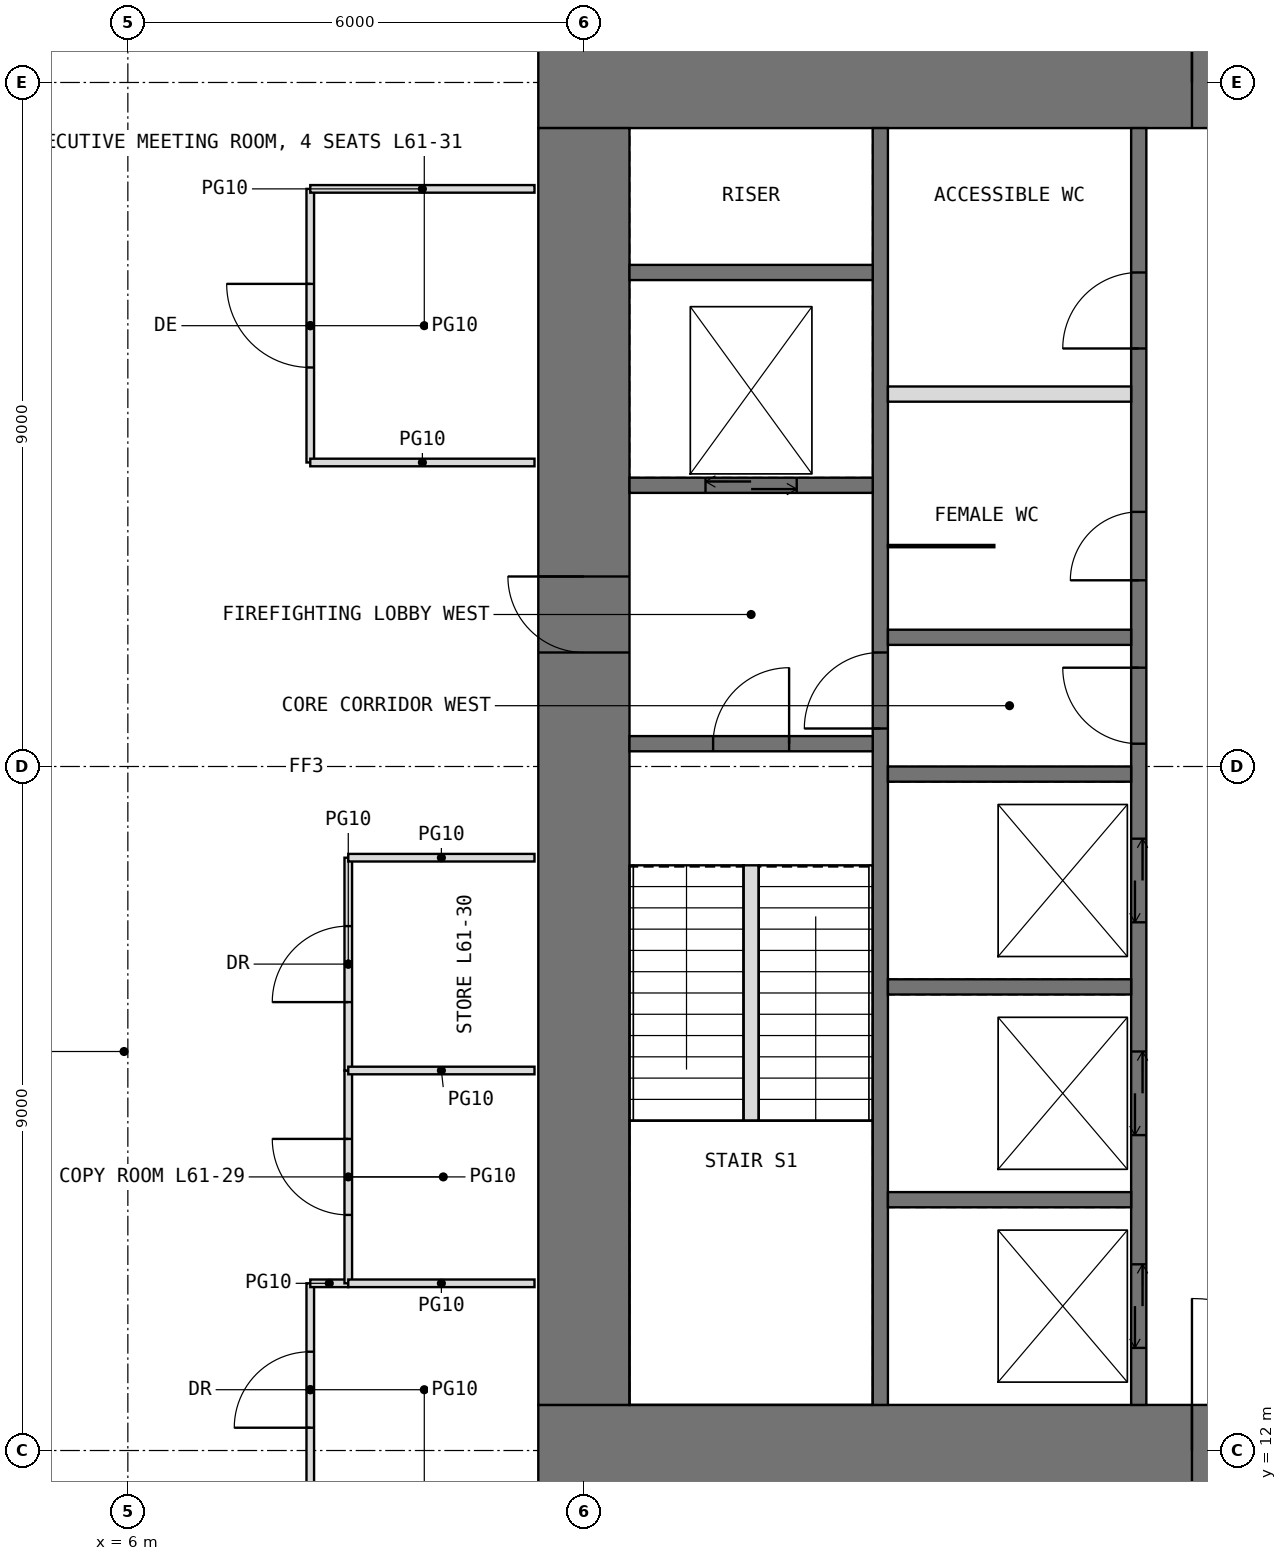
"""IFC4 building model, lengths in metres.
Left out: names, types, materials, properties, quantities, classifications, styles, units other than length and angle.
Written with IfcOpenShell. Run it as: python <this file> out.ifc"""

import sys

from ifc_helpers import new_model, si_unit, direction, frame, frame_2d, origin, place, context, subcontext, project, spatial, rectangle, extrude, element, fill, save


model = new_model("IFC4")
c1 = context("Model", 3, precision=1e-05, world=origin(), true_north=direction((0.0, 1.0)))
c2 = subcontext(c1, "Body", "Model", "MODEL_VIEW")
j1 = project(units=[si_unit("LENGTHUNIT", "METRE"), si_unit("PLANEANGLEUNIT", "RADIAN")], contexts=[c1])
p1 = place(None, origin())
s1 = spatial("IfcSite", under=j1, at=p1, CompositionType="ELEMENT")
p2 = place(p1, origin())
s2 = spatial("IfcBuilding", under=s1, at=p2, CompositionType="ELEMENT")
p3 = place(p2, frame((0.0, 0.0, 256.6)))
s3 = spatial("IfcBuildingStorey", under=s2, at=p3, CompositionType="ELEMENT", Elevation=256.6)
p4 = place(p3, frame((11.4, 12.0, -0.05), z_axis=(0.0, 0.0, 1.0), x_axis=(1.0, 0.0, 0.0)))
e1 = element("IfcWall", 1, at=p4, inside=s3, PredefinedType="SHEAR", context=c2, shape_type="SweptSolid", body=[
    extrude(rectangle(XDim=19.2, YDim=1.2, at=frame_2d((9.6, 0.0))), origin(), (0.0, 0.0, 1.0), 4.2),
])
p5 = place(p4, frame((8.6, 0.0, 0.05)))
e2 = element("IfcOpeningElement", 2, at=p5, cuts=e1, PredefinedType="OPENING", context=c2, shape_type="SweptSolid", body=[
    extrude(rectangle(XDim=2.0, YDim=2.2, at=frame_2d((1.0, 1.1))), frame((0.0, 0.61, 0.0), z_axis=(0.0, -1.0, 0.0), x_axis=(1.0, 0.0, 0.0)), (0.0, 0.0, 1.0), 1.22),
])
p6 = place(p3, frame((11.4, 30.0, -0.05), z_axis=(0.0, 0.0, 1.0), x_axis=(1.0, 0.0, 0.0)))
e3 = element("IfcWall", 3, at=p6, inside=s3, PredefinedType="SHEAR", context=c2, shape_type="SweptSolid", body=[
    extrude(rectangle(XDim=19.2, YDim=1.2, at=frame_2d((9.6, 0.0))), origin(), (0.0, 0.0, 1.0), 4.2),
])
p7 = place(p6, frame((8.6, 0.0, 0.05)))
e4 = element("IfcOpeningElement", 4, at=p7, cuts=e3, PredefinedType="OPENING", context=c2, shape_type="SweptSolid", body=[
    extrude(rectangle(XDim=2.0, YDim=2.2, at=frame_2d((1.0, 1.1))), frame((0.0, 0.61, 0.0), z_axis=(0.0, -1.0, 0.0), x_axis=(1.0, 0.0, 0.0)), (0.0, 0.0, 1.0), 1.22),
])
p8 = place(p3, frame((12.0, 12.6, -0.05), z_axis=(0.0, 0.0, 1.0), x_axis=(0.0, 1.0, 0.0)))
e5 = element("IfcWall", 5, at=p8, inside=s3, PredefinedType="SHEAR", context=c2, shape_type="SweptSolid", body=[
    extrude(rectangle(XDim=16.8, YDim=1.2, at=frame_2d((8.4, 0.0))), origin(), (0.0, 0.0, 1.0), 4.2),
])
p9 = place(p8, frame((9.9, 0.0, 0.05)))
e6 = element("IfcOpeningElement", 6, at=p9, cuts=e5, PredefinedType="OPENING", context=c2, shape_type="SweptSolid", body=[
    extrude(rectangle(XDim=1.0, YDim=2.2, at=frame_2d((0.5, 1.1))), frame((0.0, 0.61, 0.0), z_axis=(0.0, -1.0, 0.0), x_axis=(1.0, 0.0, 0.0)), (0.0, 0.0, 1.0), 1.22),
])
p10 = place(p3, frame((15.9, 12.6, -0.05), z_axis=(0.0, 0.0, 1.0), x_axis=(0.0, 1.0, 0.0)))
e7 = element("IfcWall", 7, at=p10, inside=s3, PredefinedType="SHEAR", context=c2, shape_type="SweptSolid", body=[
    extrude(rectangle(XDim=16.8, YDim=0.2, at=frame_2d((8.4, 0.0))), origin(), (0.0, 0.0, 1.0), 4.2),
])
p11 = place(p10, frame((8.9, 0.0, 0.05)))
e8 = element("IfcOpeningElement", 8, at=p11, cuts=e7, PredefinedType="OPENING", context=c2, shape_type="SweptSolid", body=[
    extrude(rectangle(XDim=1.0, YDim=2.2, at=frame_2d((0.5, 1.1))), frame((0.0, 0.11, 0.0), z_axis=(0.0, -1.0, 0.0), x_axis=(1.0, 0.0, 0.0)), (0.0, 0.0, 1.0), 0.22),
])
p12 = place(p3, frame((19.3, 12.6, -0.05), z_axis=(0.0, 0.0, 1.0), x_axis=(0.0, 1.0, 0.0)))
e9 = element("IfcWall", 9, at=p12, inside=s3, PredefinedType="SHEAR", context=c2, shape_type="SweptSolid", body=[
    extrude(rectangle(XDim=16.8, YDim=0.2, at=frame_2d((8.4, 0.0))), origin(), (0.0, 0.0, 1.0), 4.2),
])
p13 = place(p12, frame((8.7, 0.0, 0.05)))
e10 = element("IfcOpeningElement", 10, at=p13, cuts=e9, PredefinedType="OPENING", context=c2, shape_type="SweptSolid", body=[
    extrude(rectangle(XDim=1.0, YDim=2.2, at=frame_2d((0.5, 1.1))), frame((0.0, 0.11, 0.0), z_axis=(0.0, -1.0, 0.0), x_axis=(1.0, 0.0, 0.0)), (0.0, 0.0, 1.0), 0.22),
])
p14 = place(p12, frame((10.85, 0.0, 0.05)))
e11 = element("IfcOpeningElement", 11, at=p14, cuts=e9, PredefinedType="OPENING", context=c2, shape_type="SweptSolid", body=[
    extrude(rectangle(XDim=0.9, YDim=2.2, at=frame_2d((0.45, 1.1))), frame((0.0, 0.11, 0.0), z_axis=(0.0, -1.0, 0.0), x_axis=(1.0, 0.0, 0.0)), (0.0, 0.0, 1.0), 0.22),
])
p15 = place(p12, frame((13.9, 0.0, 0.05)))
e12 = element("IfcOpeningElement", 12, at=p15, cuts=e9, PredefinedType="OPENING", context=c2, shape_type="SweptSolid", body=[
    extrude(rectangle(XDim=1.0, YDim=2.2, at=frame_2d((0.5, 1.1))), frame((0.0, 0.11, 0.0), z_axis=(0.0, -1.0, 0.0), x_axis=(1.0, 0.0, 0.0)), (0.0, 0.0, 1.0), 0.22),
])
p16 = place(p12, frame((0.75, 0.0, 0.05)))
e13 = element("IfcOpeningElement", 13, at=p16, cuts=e9, PredefinedType="OPENING", context=c2, shape_type="SweptSolid", body=[
    extrude(rectangle(XDim=1.1, YDim=2.2, at=frame_2d((0.55, 1.1))), frame((0.0, 0.11, 0.0), z_axis=(0.0, -1.0, 0.0), x_axis=(1.0, 0.0, 0.0)), (0.0, 0.0, 1.0), 0.22),
])
p17 = place(p12, frame((3.55, 0.0, 0.05)))
e14 = element("IfcOpeningElement", 14, at=p17, cuts=e9, PredefinedType="OPENING", context=c2, shape_type="SweptSolid", body=[
    extrude(rectangle(XDim=1.1, YDim=2.2, at=frame_2d((0.55, 1.1))), frame((0.0, 0.11, 0.0), z_axis=(0.0, -1.0, 0.0), x_axis=(1.0, 0.0, 0.0)), (0.0, 0.0, 1.0), 0.22),
])
p18 = place(p12, frame((6.35, 0.0, 0.05)))
e15 = element("IfcOpeningElement", 15, at=p18, cuts=e9, PredefinedType="OPENING", context=c2, shape_type="SweptSolid", body=[
    extrude(rectangle(XDim=1.1, YDim=2.2, at=frame_2d((0.55, 1.1))), frame((0.0, 0.11, 0.0), z_axis=(0.0, -1.0, 0.0), x_axis=(1.0, 0.0, 0.0)), (0.0, 0.0, 1.0), 0.22),
])
p19 = place(p3, frame((12.6, 21.3, -0.05), z_axis=(0.0, 0.0, 1.0), x_axis=(1.0, 0.0, 0.0)))
e16 = element("IfcWall", 16, at=p19, inside=s3, PredefinedType="SHEAR", context=c2, shape_type="SweptSolid", body=[
    extrude(rectangle(XDim=3.2, YDim=0.2, at=frame_2d((1.6, 0.0))), origin(), (0.0, 0.0, 1.0), 4.2),
])
p20 = place(p19, frame((1.1, 0.0, 0.05)))
e17 = element("IfcOpeningElement", 17, at=p20, cuts=e16, PredefinedType="OPENING", context=c2, shape_type="SweptSolid", body=[
    extrude(rectangle(XDim=1.0, YDim=2.2, at=frame_2d((0.5, 1.1))), frame((0.0, 0.11, 0.0), z_axis=(0.0, -1.0, 0.0), x_axis=(1.0, 0.0, 0.0)), (0.0, 0.0, 1.0), 0.22),
])
p21 = place(p3, frame((12.6, 24.7, -0.05), z_axis=(0.0, 0.0, 1.0), x_axis=(1.0, 0.0, 0.0)))
e18 = element("IfcWall", 18, at=p21, inside=s3, PredefinedType="SHEAR", context=c2, shape_type="SweptSolid", body=[
    extrude(rectangle(XDim=3.2, YDim=0.2, at=frame_2d((1.6, 0.0))), origin(), (0.0, 0.0, 1.0), 4.2),
])
p22 = place(p21, frame((1.0, 0.0, 0.05)))
e19 = element("IfcOpeningElement", 19, at=p22, cuts=e18, PredefinedType="OPENING", context=c2, shape_type="SweptSolid", body=[
    extrude(rectangle(XDim=1.2, YDim=2.2, at=frame_2d((0.6, 1.1))), frame((0.0, 0.11, 0.0), z_axis=(0.0, -1.0, 0.0), x_axis=(1.0, 0.0, 0.0)), (0.0, 0.0, 1.0), 0.22),
])
for number, where, z_axis, x_axis in (
    (20, (12.6, 27.5, -0.05), (0.0, 0.0, 1.0), (1.0, 0.0, 0.0)),
    (21, (16.0, 15.3, -0.05), (0.0, 0.0, 1.0), (1.0, 0.0, 0.0)),
    (22, (16.0, 18.1, -0.05), (0.0, 0.0, 1.0), (1.0, 0.0, 0.0)),
    (23, (16.0, 20.9, -0.05), (0.0, 0.0, 1.0), (1.0, 0.0, 0.0)),
    (24, (16.0, 22.7, -0.05), (0.0, 0.0, 1.0), (1.0, 0.0, 0.0)),
):
    element("IfcWall", number, at=place(p3, frame(where, z_axis=z_axis, x_axis=x_axis)), inside=s3, PredefinedType="SHEAR", context=c2, shape_type="SweptSolid", body=[
        extrude(rectangle(XDim=3.2, YDim=0.2, at=frame_2d((1.6, 0.0))), origin(), (0.0, 0.0, 1.0), 4.2),
    ])
p23 = place(p3, frame((16.0, 25.9, 0.0), z_axis=(0.0, 0.0, 1.0), x_axis=(1.0, 0.0, 0.0)))
e25 = element("IfcWall", 25, at=p23, inside=s3, PredefinedType="PARTITIONING", context=c2, shape_type="SweptSolid", body=[
    extrude(rectangle(XDim=3.2, YDim=0.2, at=frame_2d((1.6, 0.0))), origin(), (0.0, 0.0, 1.0), 3.95),
])
p24 = place(p3, frame((16.0, 23.9, 0.0), z_axis=(0.0, 0.0, 1.0), x_axis=(1.0, 0.0, 0.0)))
e26 = element("IfcWall", 26, at=p24, inside=s3, PredefinedType="PARTITIONING", context=c2, shape_type="SweptSolid", body=[
    extrude(rectangle(XDim=1.4, YDim=0.03, at=frame_2d((0.7, 0.0))), origin(), (0.0, 0.0, 1.0), 3.95),
])
p25 = place(p3, frame((8.4, 11.4, 0.0), z_axis=(0.0, 0.0, 1.0), x_axis=(0.0, 1.0, 0.0)))
e27 = element("IfcWall", 27, at=p25, inside=s3, PredefinedType="PARTITIONING", context=c2, shape_type="SweptSolid", body=[
    extrude(rectangle(XDim=2.8, YDim=0.1, at=frame_2d((1.4, 0.0))), origin(), (0.0, 0.0, 1.0), 3.95),
])
p26 = place(p25, frame((0.9, 0.0, 0.0)))
e28 = element("IfcOpeningElement", 28, at=p26, cuts=e27, PredefinedType="OPENING", context=c2, shape_type="SweptSolid", body=[
    extrude(rectangle(XDim=1.0, YDim=2.2, at=frame_2d((0.5, 1.1))), frame((0.0, 0.06, 0.0), z_axis=(0.0, -1.0, 0.0), x_axis=(1.0, 0.0, 0.0)), (0.0, 0.0, 1.0), 0.12),
])
p27 = place(p3, frame((8.4, 14.2, 0.0), z_axis=(0.0, 0.0, 1.0), x_axis=(1.0, 0.0, 0.0)))
e29 = element("IfcWall", 29, at=p27, inside=s3, PredefinedType="PARTITIONING", context=c2, shape_type="SweptSolid", body=[
    extrude(rectangle(XDim=0.5, YDim=0.1, at=frame_2d((0.25, 0.0))), origin(), (0.0, 0.0, 1.0), 3.95),
])
p28 = place(p3, frame((8.4, 25.0, 0.0), z_axis=(0.0, 0.0, 1.0), x_axis=(0.0, 1.0, 0.0)))
e30 = element("IfcWall", 30, at=p28, inside=s3, PredefinedType="PARTITIONING", context=c2, shape_type="SweptSolid", body=[
    extrude(rectangle(XDim=3.6, YDim=0.1, at=frame_2d((1.8, 0.0))), origin(), (0.0, 0.0, 1.0), 3.95),
])
p29 = place(p28, frame((1.25, 0.0, 0.0)))
e31 = element("IfcOpeningElement", 31, at=p29, cuts=e30, PredefinedType="OPENING", context=c2, shape_type="SweptSolid", body=[
    extrude(rectangle(XDim=1.1, YDim=2.3, at=frame_2d((0.55, 1.15))), frame((0.0, 0.06, 0.0), z_axis=(0.0, -1.0, 0.0), x_axis=(1.0, 0.0, 0.0)), (0.0, 0.0, 1.0), 0.12),
])
for number, where, z_axis, x_axis in (
    (32, (8.4, 25.0, 0.0), (0.0, 0.0, 1.0), (1.0, 0.0, 0.0)),
    (33, (8.4, 28.6, 0.0), (0.0, 0.0, 1.0), (1.0, 0.0, 0.0)),
):
    element("IfcWall", number, at=place(p3, frame(where, z_axis=z_axis, x_axis=x_axis)), inside=s3, PredefinedType="PARTITIONING", context=c2, shape_type="SweptSolid", body=[
        extrude(rectangle(XDim=2.95, YDim=0.1, at=frame_2d((1.475, 0.0))), origin(), (0.0, 0.0, 1.0), 3.95),
    ])
p30 = place(p3, frame((8.9, 14.2, 0.0), z_axis=(0.0, 0.0, 1.0), x_axis=(0.0, 1.0, 0.0)))
e34 = element("IfcWall", 34, at=p30, inside=s3, PredefinedType="PARTITIONING", context=c2, shape_type="SweptSolid", body=[
    extrude(rectangle(XDim=2.8, YDim=0.1, at=frame_2d((1.4, 0.0))), origin(), (0.0, 0.0, 1.0), 3.95),
])
p31 = place(p30, frame((0.9, 0.0, 0.0)))
e35 = element("IfcOpeningElement", 35, at=p31, cuts=e34, PredefinedType="OPENING", context=c2, shape_type="SweptSolid", body=[
    extrude(rectangle(XDim=1.0, YDim=2.2, at=frame_2d((0.5, 1.1))), frame((0.0, 0.06, 0.0), z_axis=(0.0, -1.0, 0.0), x_axis=(1.0, 0.0, 0.0)), (0.0, 0.0, 1.0), 0.12),
])
p32 = place(p3, frame((8.9, 14.2, 0.0), z_axis=(0.0, 0.0, 1.0), x_axis=(1.0, 0.0, 0.0)))
e36 = element("IfcWall", 36, at=p32, inside=s3, PredefinedType="PARTITIONING", context=c2, shape_type="SweptSolid", body=[
    extrude(rectangle(XDim=2.45, YDim=0.1, at=frame_2d((1.225, 0.0))), origin(), (0.0, 0.0, 1.0), 3.95),
])
p33 = place(p3, frame((8.9, 17.0, 0.0), z_axis=(0.0, 0.0, 1.0), x_axis=(0.0, 1.0, 0.0)))
e37 = element("IfcWall", 37, at=p33, inside=s3, PredefinedType="PARTITIONING", context=c2, shape_type="SweptSolid", body=[
    extrude(rectangle(XDim=2.8, YDim=0.1, at=frame_2d((1.4, 0.0))), origin(), (0.0, 0.0, 1.0), 3.95),
])
p34 = place(p33, frame((0.9, 0.0, 0.0)))
e38 = element("IfcOpeningElement", 38, at=p34, cuts=e37, PredefinedType="OPENING", context=c2, shape_type="SweptSolid", body=[
    extrude(rectangle(XDim=1.0, YDim=2.2, at=frame_2d((0.5, 1.1))), frame((0.0, 0.06, 0.0), z_axis=(0.0, -1.0, 0.0), x_axis=(1.0, 0.0, 0.0)), (0.0, 0.0, 1.0), 0.12),
])
for number, where, z_axis, x_axis in (
    (39, (8.9, 17.0, 0.0), (0.0, 0.0, 1.0), (1.0, 0.0, 0.0)),
    (40, (8.9, 19.8, 0.0), (0.0, 0.0, 1.0), (1.0, 0.0, 0.0)),
):
    element("IfcWall", number, at=place(p3, frame(where, z_axis=z_axis, x_axis=x_axis)), inside=s3, PredefinedType="PARTITIONING", context=c2, shape_type="SweptSolid", body=[
        extrude(rectangle(XDim=2.45, YDim=0.1, at=frame_2d((1.225, 0.0))), origin(), (0.0, 0.0, 1.0), 3.95),
    ])
p35 = place(p3, frame((14.2, 16.34, 0.0), z_axis=(0.0, 0.0, 1.0), x_axis=(0.0, 1.0, 0.0)))
e41 = element("IfcWall", 41, at=p35, inside=s3, PredefinedType="PARTITIONING", context=c2, shape_type="SweptSolid", body=[
    extrude(rectangle(XDim=3.36, YDim=0.2, at=frame_2d((1.68, 0.0))), origin(), (0.0, 0.0, 1.0), 4.2),
])
p36 = place(p5, origin())
e42 = element("IfcDoor", 42, at=p36, inside=s3, OperationType="DOUBLE_DOOR_SINGLE_SWING", PredefinedType="DOOR", context=c2, shape_type="SweptSolid", body=[
    extrude(rectangle(XDim=2.0, YDim=2.2, at=frame_2d((1.0, 1.1))), frame((0.0, 0.025, 0.0), z_axis=(0.0, -1.0, 0.0), x_axis=(1.0, 0.0, 0.0)), (0.0, 0.0, 1.0), 0.05),
])
fill(e2, e42)
p37 = place(p7, origin())
e43 = element("IfcDoor", 43, at=p37, inside=s3, OperationType="DOUBLE_DOOR_SINGLE_SWING", PredefinedType="DOOR", context=c2, shape_type="SweptSolid", body=[
    extrude(rectangle(XDim=2.0, YDim=2.2, at=frame_2d((1.0, 1.1))), frame((0.0, 0.025, 0.0), z_axis=(0.0, -1.0, 0.0), x_axis=(1.0, 0.0, 0.0)), (0.0, 0.0, 1.0), 0.05),
])
fill(e4, e43)
p38 = place(p9, origin())
e44 = element("IfcDoor", 44, at=p38, inside=s3, OperationType="SINGLE_SWING_RIGHT", PredefinedType="DOOR", context=c2, shape_type="SweptSolid", body=[
    extrude(rectangle(XDim=1.0, YDim=2.2, at=frame_2d((0.5, 1.1))), frame((0.0, 0.025, 0.0), z_axis=(0.0, -1.0, 0.0), x_axis=(1.0, 0.0, 0.0)), (0.0, 0.0, 1.0), 0.05),
])
fill(e6, e44)
p39 = place(p20, origin())
e45 = element("IfcDoor", 45, at=p39, inside=s3, OperationType="SINGLE_SWING_RIGHT", PredefinedType="DOOR", context=c2, shape_type="SweptSolid", body=[
    extrude(rectangle(XDim=1.0, YDim=2.2, at=frame_2d((0.5, 1.1))), frame((0.0, 0.025, 0.0), z_axis=(0.0, -1.0, 0.0), x_axis=(1.0, 0.0, 0.0)), (0.0, 0.0, 1.0), 0.05),
])
fill(e17, e45)
p40 = place(p11, origin())
e46 = element("IfcDoor", 46, at=p40, inside=s3, OperationType="SINGLE_SWING_LEFT", PredefinedType="DOOR", context=c2, shape_type="SweptSolid", body=[
    extrude(rectangle(XDim=1.0, YDim=2.2, at=frame_2d((0.5, 1.1))), frame((0.0, 0.025, 0.0), z_axis=(0.0, -1.0, 0.0), x_axis=(1.0, 0.0, 0.0)), (0.0, 0.0, 1.0), 0.05),
])
fill(e8, e46)
p41 = place(p13, origin())
e47 = element("IfcDoor", 47, at=p41, inside=s3, OperationType="SINGLE_SWING_RIGHT", PredefinedType="DOOR", context=c2, shape_type="SweptSolid", body=[
    extrude(rectangle(XDim=1.0, YDim=2.2, at=frame_2d((0.5, 1.1))), frame((0.0, 0.025, 0.0), z_axis=(0.0, -1.0, 0.0), x_axis=(1.0, 0.0, 0.0)), (0.0, 0.0, 1.0), 0.05),
])
fill(e10, e47)
p42 = place(p14, origin())
e48 = element("IfcDoor", 48, at=p42, inside=s3, OperationType="SINGLE_SWING_LEFT", PredefinedType="DOOR", context=c2, shape_type="SweptSolid", body=[
    extrude(rectangle(XDim=0.9, YDim=2.2, at=frame_2d((0.45, 1.1))), frame((0.0, 0.025, 0.0), z_axis=(0.0, -1.0, 0.0), x_axis=(1.0, 0.0, 0.0)), (0.0, 0.0, 1.0), 0.05),
])
fill(e11, e48)
p43 = place(p15, origin())
e49 = element("IfcDoor", 49, at=p43, inside=s3, OperationType="SINGLE_SWING_LEFT", PredefinedType="DOOR", context=c2, shape_type="SweptSolid", body=[
    extrude(rectangle(XDim=1.0, YDim=2.2, at=frame_2d((0.5, 1.1))), frame((0.0, 0.025, 0.0), z_axis=(0.0, -1.0, 0.0), x_axis=(1.0, 0.0, 0.0)), (0.0, 0.0, 1.0), 0.05),
])
fill(e12, e49)
p44 = place(p26, origin())
e50 = element("IfcDoor", 50, at=p44, inside=s3, OperationType="SINGLE_SWING_LEFT", PredefinedType="DOOR", context=c2, shape_type="SweptSolid", body=[
    extrude(rectangle(XDim=1.0, YDim=2.2, at=frame_2d((0.5, 1.1))), frame((0.0, 0.025, 0.0), z_axis=(0.0, -1.0, 0.0), x_axis=(1.0, 0.0, 0.0)), (0.0, 0.0, 1.0), 0.05),
])
fill(e28, e50)
p45 = place(p31, origin())
e51 = element("IfcDoor", 51, at=p45, inside=s3, OperationType="SINGLE_SWING_RIGHT", PredefinedType="DOOR", context=c2, shape_type="SweptSolid", body=[
    extrude(rectangle(XDim=1.0, YDim=2.2, at=frame_2d((0.5, 1.1))), frame((0.0, 0.025, 0.0), z_axis=(0.0, -1.0, 0.0), x_axis=(1.0, 0.0, 0.0)), (0.0, 0.0, 1.0), 0.05),
])
fill(e35, e51)
p46 = place(p34, origin())
e52 = element("IfcDoor", 52, at=p46, inside=s3, OperationType="SINGLE_SWING_LEFT", PredefinedType="DOOR", context=c2, shape_type="SweptSolid", body=[
    extrude(rectangle(XDim=1.0, YDim=2.2, at=frame_2d((0.5, 1.1))), frame((0.0, 0.025, 0.0), z_axis=(0.0, -1.0, 0.0), x_axis=(1.0, 0.0, 0.0)), (0.0, 0.0, 1.0), 0.05),
])
fill(e38, e52)
p47 = place(p29, origin())
e53 = element("IfcDoor", 53, at=p47, inside=s3, OperationType="SINGLE_SWING_RIGHT", PredefinedType="DOOR", context=c2, shape_type="SweptSolid", body=[
    extrude(rectangle(XDim=1.1, YDim=2.3, at=frame_2d((0.55, 1.15))), frame((0.0, 0.025, 0.0), z_axis=(0.0, -1.0, 0.0), x_axis=(1.0, 0.0, 0.0)), (0.0, 0.0, 1.0), 0.05),
])
fill(e31, e53)
p48 = place(p16, origin())
e54 = element("IfcDoor", 54, at=p48, inside=s3, OperationType="DOUBLE_DOOR_SLIDING", PredefinedType="DOOR", context=c2, shape_type="SweptSolid", body=[
    extrude(rectangle(XDim=1.1, YDim=2.2, at=frame_2d((0.55, 1.1))), frame((0.0, 0.025, 0.0), z_axis=(0.0, -1.0, 0.0), x_axis=(1.0, 0.0, 0.0)), (0.0, 0.0, 1.0), 0.05),
])
fill(e13, e54)
p49 = place(p17, origin())
e55 = element("IfcDoor", 55, at=p49, inside=s3, OperationType="DOUBLE_DOOR_SLIDING", PredefinedType="DOOR", context=c2, shape_type="SweptSolid", body=[
    extrude(rectangle(XDim=1.1, YDim=2.2, at=frame_2d((0.55, 1.1))), frame((0.0, 0.025, 0.0), z_axis=(0.0, -1.0, 0.0), x_axis=(1.0, 0.0, 0.0)), (0.0, 0.0, 1.0), 0.05),
])
fill(e14, e55)
p50 = place(p18, origin())
e56 = element("IfcDoor", 56, at=p50, inside=s3, OperationType="DOUBLE_DOOR_SLIDING", PredefinedType="DOOR", context=c2, shape_type="SweptSolid", body=[
    extrude(rectangle(XDim=1.1, YDim=2.2, at=frame_2d((0.55, 1.1))), frame((0.0, 0.025, 0.0), z_axis=(0.0, -1.0, 0.0), x_axis=(1.0, 0.0, 0.0)), (0.0, 0.0, 1.0), 0.05),
])
fill(e15, e56)
p51 = place(p22, origin())
e57 = element("IfcDoor", 57, at=p51, inside=s3, OperationType="DOUBLE_DOOR_SLIDING", PredefinedType="DOOR", context=c2, shape_type="SweptSolid", body=[
    extrude(rectangle(XDim=1.2, YDim=2.2, at=frame_2d((0.6, 1.1))), frame((0.0, 0.025, 0.0), z_axis=(0.0, -1.0, 0.0), x_axis=(1.0, 0.0, 0.0)), (0.0, 0.0, 1.0), 0.05),
])
fill(e19, e57)
save(model, sys.argv[1])
